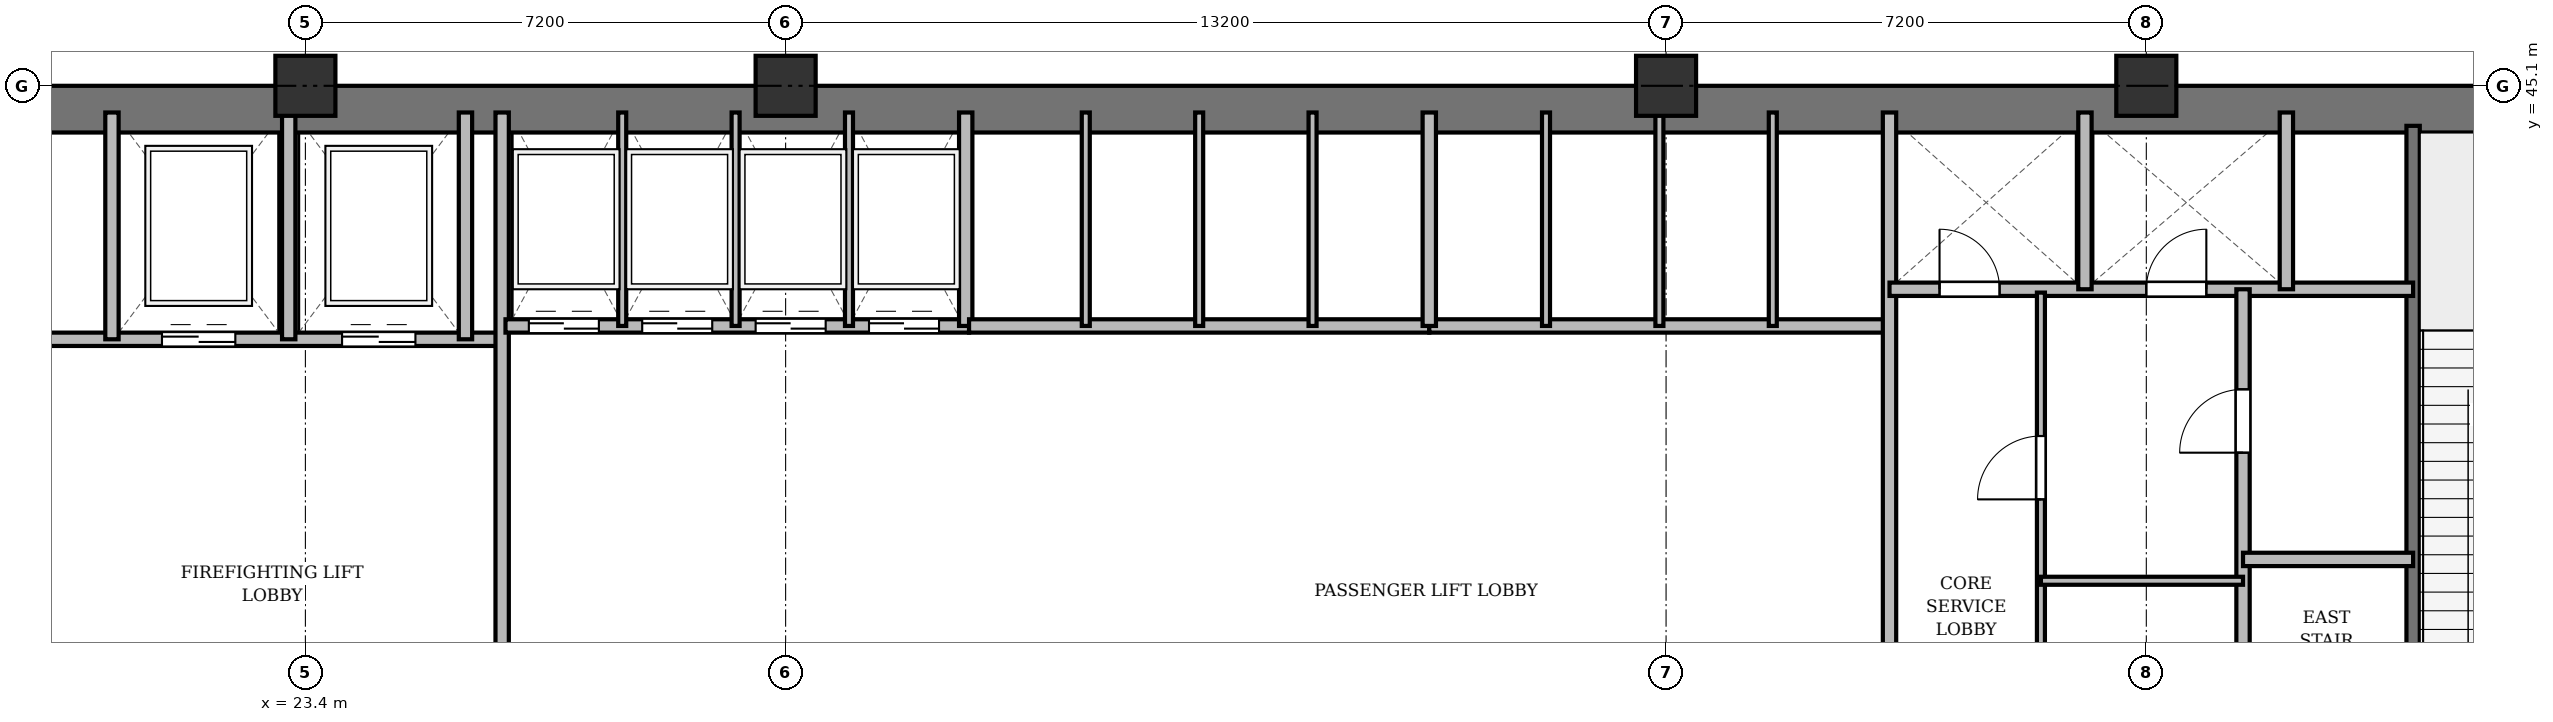
"""IFC4 building model, lengths in metres.
Left out: names, types, materials, properties, quantities, classifications, styles, units other than length and angle.
Written with IfcOpenShell. Run it as: python <this file> out.ifc"""

import sys

from ifc_helpers import new_model, si_unit, direction, frame, frame_2d, origin, origin_2d, place, context, subcontext, project, spatial, rectangle, extrude, source, transform, mapped, element, fill, save


model = new_model("IFC4")
c1 = context("Model", 3, precision=1e-05, world=origin(), true_north=direction((0.0, 1.0)))
c2 = subcontext(c1, "Body", "Model", "MODEL_VIEW")
j1 = project(units=[si_unit("LENGTHUNIT", "METRE"), si_unit("PLANEANGLEUNIT", "RADIAN")], contexts=[c1])
p1 = place(None, origin())
s1 = spatial("IfcSite", under=j1, at=p1, CompositionType="ELEMENT")
p2 = place(p1, origin())
s2 = spatial("IfcBuilding", under=s1, at=p2, CompositionType="ELEMENT")
p3 = place(p2, frame((0.0, 0.0, 73.9)))
s3 = spatial("IfcBuildingStorey", under=s2, at=p3, CompositionType="ELEMENT", Elevation=73.9)
m1 = source(origin(), c2, "Body", "SweptSolid", [
    extrude(rectangle(XDim=0.9, YDim=0.9, at=origin_2d()), origin(), (0.0, 0.0, 1.0), 7.8),
])
for number, where, z_axis, x_axis in (
    (1, (23.4, 45.1, 0.0), (0.0, 0.0, 1.0), (1.0, 0.0, 0.0)),
    (2, (30.6, 45.1, 0.0), (0.0, 0.0, 1.0), (1.0, 0.0, 0.0)),
    (3, (43.8, 45.1, 0.0), (0.0, 0.0, 1.0), (1.0, 0.0, 0.0)),
    (4, (51.0, 45.1, 0.0), (0.0, 0.0, 1.0), (1.0, 0.0, 0.0)),
):
    element("IfcColumn", number, at=place(p3, frame(where, z_axis=z_axis, x_axis=x_axis)), inside=s3, PredefinedType="COLUMN", context=c2, shape_type="MappedRepresentation", body=[
        mapped(m1, transform((0.0, 0.0, 0.0), x_axis=(1.0, 0.0, 0.0), y_axis=(0.0, 1.0, 0.0), z_axis=(0.0, 0.0, 1.0), scale=1.0)),
    ])
p4 = place(p3, frame((15.5, 44.75, 0.0), z_axis=(0.0, 0.0, 1.0), x_axis=(1.0, 0.0, 0.0)))
e5 = element("IfcWall", 5, at=p4, inside=s3, PredefinedType="SHEAR", context=c2, shape_type="SweptSolid", body=[
    extrude(rectangle(XDim=43.4, YDim=0.7, at=frame_2d((21.7, 0.0))), origin(), (0.0, 0.0, 1.0), 7.42),
])
p5 = place(p3, frame((55.0, 33.4, 0.0), z_axis=(0.0, 0.0, 1.0), x_axis=(0.0, 1.0, 0.0)))
e6 = element("IfcWall", 6, at=p5, inside=s3, PredefinedType="SHEAR", context=c2, shape_type="SweptSolid", body=[
    extrude(rectangle(XDim=11.1, YDim=0.2, at=frame_2d((5.55, 0.0))), origin(), (0.0, 0.0, 1.0), 7.42),
])
p6 = place(p5, frame((0.85, 0.0, 0.0)))
e7 = element("IfcOpeningElement", 7, at=p6, cuts=e6, PredefinedType="OPENING", context=c2, shape_type="SweptSolid", body=[
    extrude(rectangle(XDim=1.1, YDim=2.15, at=frame_2d((0.55, 1.075))), frame((0.0, 0.11, 0.0), z_axis=(0.0, -1.0, 0.0), x_axis=(1.0, 0.0, 0.0)), (0.0, 0.0, 1.0), 0.22),
])
p7 = place(p3, frame((19.55, 41.3, 0.0), z_axis=(0.0, 0.0, 1.0), x_axis=(1.0, 0.0, 0.0)))
e8 = element("IfcWall", 8, at=p7, inside=s3, PredefinedType="SOLIDWALL", context=c2, shape_type="SweptSolid", body=[
    extrude(rectangle(XDim=6.75, YDim=0.2, at=frame_2d((3.375, 0.0))), origin(), (0.0, 0.0, 1.0), 7.42),
])
p8 = place(p7, frame((1.7, 0.0, 0.0)))
e9 = element("IfcOpeningElement", 9, at=p8, cuts=e8, PredefinedType="OPENING", context=c2, shape_type="SweptSolid", body=[
    extrude(rectangle(XDim=1.1, YDim=2.15, at=frame_2d((0.55, 1.075))), frame((0.0, 0.11, 0.0), z_axis=(0.0, -1.0, 0.0), x_axis=(1.0, 0.0, 0.0)), (0.0, 0.0, 1.0), 0.22),
])
p9 = place(p7, frame((4.4, 0.0, 0.0)))
e10 = element("IfcOpeningElement", 10, at=p9, cuts=e8, PredefinedType="OPENING", context=c2, shape_type="SweptSolid", body=[
    extrude(rectangle(XDim=1.1, YDim=2.15, at=frame_2d((0.55, 1.075))), frame((0.0, 0.11, 0.0), z_axis=(0.0, -1.0, 0.0), x_axis=(1.0, 0.0, 0.0)), (0.0, 0.0, 1.0), 0.22),
])
for number, where, z_axis, x_axis in (
    (11, (20.5, 41.3, 0.0), (0.0, 0.0, 1.0), (0.0, 1.0, 0.0)),
    (12, (23.15, 41.3, 0.0), (0.0, 0.0, 1.0), (0.0, 1.0, 0.0)),
    (13, (25.8, 41.3, 0.0), (0.0, 0.0, 1.0), (0.0, 1.0, 0.0)),
):
    element("IfcWall", number, at=place(p3, frame(where, z_axis=z_axis, x_axis=x_axis)), inside=s3, PredefinedType="SOLIDWALL", context=c2, shape_type="SweptSolid", body=[
        extrude(rectangle(XDim=3.4, YDim=0.2, at=frame_2d((1.7, 0.0))), origin(), (0.0, 0.0, 1.0), 7.42),
    ])
p10 = place(p3, frame((26.35, 33.4, 0.0), z_axis=(0.0, 0.0, 1.0), x_axis=(0.0, 1.0, 0.0)))
e14 = element("IfcWall", 14, at=p10, inside=s3, PredefinedType="SOLIDWALL", context=c2, shape_type="SweptSolid", body=[
    extrude(rectangle(XDim=11.3, YDim=0.2, at=frame_2d((5.65, 0.0))), origin(), (0.0, 0.0, 1.0), 6.77),
])
p11 = place(p3, frame((26.4, 41.5, 0.0), z_axis=(0.0, 0.0, 1.0), x_axis=(1.0, 0.0, 0.0)))
e15 = element("IfcWall", 15, at=p11, inside=s3, PredefinedType="SOLIDWALL", context=c2, shape_type="SweptSolid", body=[
    extrude(rectangle(XDim=6.95, YDim=0.2, at=frame_2d((3.475, 0.0))), origin(), (0.0, 0.0, 1.0), 7.42),
])
p12 = place(p11, frame((0.35, 0.0, 0.0)))
e16 = element("IfcOpeningElement", 16, at=p12, cuts=e15, PredefinedType="OPENING", context=c2, shape_type="SweptSolid", body=[
    extrude(rectangle(XDim=1.05, YDim=2.15, at=frame_2d((0.525, 1.075))), frame((0.0, 0.11, 0.0), z_axis=(0.0, -1.0, 0.0), x_axis=(1.0, 0.0, 0.0)), (0.0, 0.0, 1.0), 0.22),
])
p13 = place(p11, frame((2.05, 0.0, 0.0)))
e17 = element("IfcOpeningElement", 17, at=p13, cuts=e15, PredefinedType="OPENING", context=c2, shape_type="SweptSolid", body=[
    extrude(rectangle(XDim=1.05, YDim=2.15, at=frame_2d((0.525, 1.075))), frame((0.0, 0.11, 0.0), z_axis=(0.0, -1.0, 0.0), x_axis=(1.0, 0.0, 0.0)), (0.0, 0.0, 1.0), 0.22),
])
p14 = place(p11, frame((3.75, 0.0, 0.0)))
e18 = element("IfcOpeningElement", 18, at=p14, cuts=e15, PredefinedType="OPENING", context=c2, shape_type="SweptSolid", body=[
    extrude(rectangle(XDim=1.05, YDim=2.15, at=frame_2d((0.525, 1.075))), frame((0.0, 0.11, 0.0), z_axis=(0.0, -1.0, 0.0), x_axis=(1.0, 0.0, 0.0)), (0.0, 0.0, 1.0), 0.22),
])
p15 = place(p11, frame((5.45, 0.0, 0.0)))
e19 = element("IfcOpeningElement", 19, at=p15, cuts=e15, PredefinedType="OPENING", context=c2, shape_type="SweptSolid", body=[
    extrude(rectangle(XDim=1.05, YDim=2.15, at=frame_2d((0.525, 1.075))), frame((0.0, 0.11, 0.0), z_axis=(0.0, -1.0, 0.0), x_axis=(1.0, 0.0, 0.0)), (0.0, 0.0, 1.0), 0.22),
])
p16 = place(p3, frame((33.3, 41.5, 0.0), z_axis=(0.0, 0.0, 1.0), x_axis=(0.0, 1.0, 0.0)))
e20 = element("IfcWall", 20, at=p16, inside=s3, PredefinedType="SOLIDWALL", context=c2, shape_type="SweptSolid", body=[
    extrude(rectangle(XDim=3.2, YDim=0.2, at=frame_2d((1.6, 0.0))), origin(), (0.0, 0.0, 1.0), 7.42),
])
for number, where, z_axis, x_axis in (
    (21, (28.15, 41.5, 0.0), (0.0, 0.0, 1.0), (0.0, 1.0, 0.0)),
    (22, (29.85, 41.5, 0.0), (0.0, 0.0, 1.0), (0.0, 1.0, 0.0)),
    (23, (31.55, 41.5, 0.0), (0.0, 0.0, 1.0), (0.0, 1.0, 0.0)),
):
    element("IfcWall", number, at=place(p3, frame(where, z_axis=z_axis, x_axis=x_axis)), inside=s3, PredefinedType="PARTITIONING", context=c2, shape_type="SweptSolid", body=[
        extrude(rectangle(XDim=3.2, YDim=0.12, at=frame_2d((1.6, 0.0))), origin(), (0.0, 0.0, 1.0), 7.42),
    ])
p17 = place(p3, frame((33.35, 41.5, 0.0), z_axis=(0.0, 0.0, 1.0), x_axis=(1.0, 0.0, 0.0)))
e24 = element("IfcWall", 24, at=p17, inside=s3, PredefinedType="SOLIDWALL", context=c2, shape_type="SweptSolid", body=[
    extrude(rectangle(XDim=6.9, YDim=0.2, at=frame_2d((3.45, 0.0))), origin(), (0.0, 0.0, 1.0), 7.42),
])
for number, where, z_axis, x_axis in (
    (25, (35.1, 41.5, 0.0), (0.0, 0.0, 1.0), (0.0, 1.0, 0.0)),
    (26, (36.8, 41.5, 0.0), (0.0, 0.0, 1.0), (0.0, 1.0, 0.0)),
    (27, (38.5, 41.5, 0.0), (0.0, 0.0, 1.0), (0.0, 1.0, 0.0)),
):
    element("IfcWall", number, at=place(p3, frame(where, z_axis=z_axis, x_axis=x_axis)), inside=s3, PredefinedType="PARTITIONING", context=c2, shape_type="SweptSolid", body=[
        extrude(rectangle(XDim=3.2, YDim=0.12, at=frame_2d((1.6, 0.0))), origin(), (0.0, 0.0, 1.0), 7.42),
    ])
p18 = place(p3, frame((40.25, 41.5, 0.0), z_axis=(0.0, 0.0, 1.0), x_axis=(1.0, 0.0, 0.0)))
e28 = element("IfcWall", 28, at=p18, inside=s3, PredefinedType="SOLIDWALL", context=c2, shape_type="SweptSolid", body=[
    extrude(rectangle(XDim=6.9, YDim=0.2, at=frame_2d((3.45, 0.0))), origin(), (0.0, 0.0, 1.0), 6.832),
])
p19 = place(p3, frame((40.25, 41.5, 0.0), z_axis=(0.0, 0.0, 1.0), x_axis=(0.0, 1.0, 0.0)))
e29 = element("IfcWall", 29, at=p19, inside=s3, PredefinedType="SOLIDWALL", context=c2, shape_type="SweptSolid", body=[
    extrude(rectangle(XDim=3.2, YDim=0.2, at=frame_2d((1.6, 0.0))), origin(), (0.0, 0.0, 1.0), 7.42),
])
p20 = place(p3, frame((42.0, 41.5, 0.0), z_axis=(0.0, 0.0, 1.0), x_axis=(0.0, 1.0, 0.0)))
e30 = element("IfcWall", 30, at=p20, inside=s3, PredefinedType="PARTITIONING", context=c2, shape_type="SweptSolid", body=[
    extrude(rectangle(XDim=3.2, YDim=0.12, at=frame_2d((1.6, 0.0))), origin(), (0.0, 0.0, 1.0), 7.42),
])
p21 = place(p3, frame((43.7, 41.5, 0.0), z_axis=(0.0, 0.0, 1.0), x_axis=(0.0, 1.0, 0.0)))
e31 = element("IfcWall", 31, at=p21, inside=s3, PredefinedType="PARTITIONING", context=c2, shape_type="SweptSolid", body=[
    extrude(rectangle(XDim=3.2, YDim=0.12, at=frame_2d((1.6, 0.0))), origin(), (0.0, 0.0, 1.0), 6.832),
])
p22 = place(p3, frame((45.4, 41.5, 0.0), z_axis=(0.0, 0.0, 1.0), x_axis=(0.0, 1.0, 0.0)))
e32 = element("IfcWall", 32, at=p22, inside=s3, PredefinedType="PARTITIONING", context=c2, shape_type="SweptSolid", body=[
    extrude(rectangle(XDim=3.2, YDim=0.12, at=frame_2d((1.6, 0.0))), origin(), (0.0, 0.0, 1.0), 7.42),
])
p23 = place(p3, frame((47.15, 33.4, 0.0), z_axis=(0.0, 0.0, 1.0), x_axis=(0.0, 1.0, 0.0)))
e33 = element("IfcWall", 33, at=p23, inside=s3, PredefinedType="SOLIDWALL", context=c2, shape_type="SweptSolid", body=[
    extrude(rectangle(XDim=11.3, YDim=0.2, at=frame_2d((5.65, 0.0))), origin(), (0.0, 0.0, 1.0), 6.77),
])
p24 = place(p3, frame((47.15, 42.05, 0.0), z_axis=(0.0, 0.0, 1.0), x_axis=(1.0, 0.0, 0.0)))
e34 = element("IfcWall", 34, at=p24, inside=s3, PredefinedType="SOLIDWALL", context=c2, shape_type="SweptSolid", body=[
    extrude(rectangle(XDim=7.85, YDim=0.2, at=frame_2d((3.925, 0.0))), origin(), (0.0, 0.0, 1.0), 6.832),
])
p25 = place(p24, frame((0.75, 0.0, 0.0)))
e35 = element("IfcOpeningElement", 35, at=p25, cuts=e34, PredefinedType="OPENING", context=c2, shape_type="SweptSolid", body=[
    extrude(rectangle(XDim=0.9, YDim=2.1, at=frame_2d((0.45, 1.05))), frame((0.0, 0.11, 0.0), z_axis=(0.0, -1.0, 0.0), x_axis=(1.0, 0.0, 0.0)), (0.0, 0.0, 1.0), 0.22),
])
p26 = place(p24, frame((3.85, 0.0, 0.0)))
e36 = element("IfcOpeningElement", 36, at=p26, cuts=e34, PredefinedType="OPENING", context=c2, shape_type="SweptSolid", body=[
    extrude(rectangle(XDim=0.9, YDim=2.1, at=frame_2d((0.45, 1.05))), frame((0.0, 0.11, 0.0), z_axis=(0.0, -1.0, 0.0), x_axis=(1.0, 0.0, 0.0)), (0.0, 0.0, 1.0), 0.22),
])
for number, where, z_axis, x_axis in (
    (37, (50.08, 42.05, 0.0), (0.0, 0.0, 1.0), (0.0, 1.0, 0.0)),
    (38, (53.1, 42.05, 0.0), (0.0, 0.0, 1.0), (0.0, 1.0, 0.0)),
):
    element("IfcWall", number, at=place(p3, frame(where, z_axis=z_axis, x_axis=x_axis)), inside=s3, PredefinedType="SOLIDWALL", context=c2, shape_type="SweptSolid", body=[
        extrude(rectangle(XDim=2.65, YDim=0.2, at=frame_2d((1.325, 0.0))), origin(), (0.0, 0.0, 1.0), 7.42),
    ])
p27 = place(p3, frame((52.45, 33.4, 0.0), z_axis=(0.0, 0.0, 1.0), x_axis=(0.0, 1.0, 0.0)))
e39 = element("IfcWall", 39, at=p27, inside=s3, PredefinedType="PARTITIONING", context=c2, shape_type="SweptSolid", body=[
    extrude(rectangle(XDim=8.65, YDim=0.2, at=frame_2d((4.325, 0.0))), origin(), (0.0, 0.0, 1.0), 6.77),
])
p28 = place(p27, frame((6.2, 0.0, 0.0)))
e40 = element("IfcOpeningElement", 40, at=p28, cuts=e39, PredefinedType="OPENING", context=c2, shape_type="SweptSolid", body=[
    extrude(rectangle(XDim=0.95, YDim=2.15, at=frame_2d((0.475, 1.075))), frame((0.0, 0.11, 0.0), z_axis=(0.0, -1.0, 0.0), x_axis=(1.0, 0.0, 0.0)), (0.0, 0.0, 1.0), 0.22),
])
p29 = place(p3, frame((52.45, 38.0, 0.0), z_axis=(0.0, 0.0, 1.0), x_axis=(1.0, 0.0, 0.0)))
e41 = element("IfcWall", 41, at=p29, inside=s3, PredefinedType="PARTITIONING", context=c2, shape_type="SweptSolid", body=[
    extrude(rectangle(XDim=2.55, YDim=0.2, at=frame_2d((1.275, 0.0))), origin(), (0.0, 0.0, 1.0), 7.42),
])
p30 = place(p3, frame((49.42, 33.4, 0.0), z_axis=(0.0, 0.0, 1.0), x_axis=(0.0, 1.0, 0.0)))
e42 = element("IfcWall", 42, at=p30, inside=s3, PredefinedType="PARTITIONING", context=c2, shape_type="SweptSolid", body=[
    extrude(rectangle(XDim=8.6, YDim=0.12, at=frame_2d((4.3, 0.0))), origin(), (0.0, 0.0, 1.0), 6.77),
])
p31 = place(p30, frame((1.3, 0.0, 0.0)))
e43 = element("IfcOpeningElement", 43, at=p31, cuts=e42, PredefinedType="OPENING", context=c2, shape_type="SweptSolid", body=[
    extrude(rectangle(XDim=0.95, YDim=2.15, at=frame_2d((0.475, 1.075))), frame((0.0, 0.07, 0.0), z_axis=(0.0, -1.0, 0.0), x_axis=(1.0, 0.0, 0.0)), (0.0, 0.0, 1.0), 0.14),
])
p32 = place(p30, frame((5.5, 0.0, 0.0)))
e44 = element("IfcOpeningElement", 44, at=p32, cuts=e42, PredefinedType="OPENING", context=c2, shape_type="SweptSolid", body=[
    extrude(rectangle(XDim=0.95, YDim=2.15, at=frame_2d((0.475, 1.075))), frame((0.0, 0.07, 0.0), z_axis=(0.0, -1.0, 0.0), x_axis=(1.0, 0.0, 0.0)), (0.0, 0.0, 1.0), 0.14),
])
p33 = place(p3, frame((49.42, 37.68, 0.0), z_axis=(0.0, 0.0, 1.0), x_axis=(1.0, 0.0, 0.0)))
e45 = element("IfcWall", 45, at=p33, inside=s3, PredefinedType="PARTITIONING", context=c2, shape_type="SweptSolid", body=[
    extrude(rectangle(XDim=3.03, YDim=0.12, at=frame_2d((1.515, 0.0))), origin(), (0.0, 0.0, 1.0), 6.832),
])
m2 = source(origin(), c2, "Body", "SweptSolid", [
    extrude(rectangle(XDim=1.1, YDim=2.15, at=frame_2d((0.55, 1.075))), frame((0.0, 0.025, 0.0), z_axis=(0.0, -1.0, 0.0), x_axis=(1.0, 0.0, 0.0)), (0.0, 0.0, 1.0), 0.05),
])
p34 = place(p8, origin())
e46 = element("IfcDoor", 46, at=p34, inside=s3, OperationType="DOUBLE_DOOR_SLIDING", PredefinedType="DOOR", context=c2, shape_type="MappedRepresentation", body=[
    mapped(m2, transform((0.0, 0.0, 0.0), x_axis=(1.0, 0.0, 0.0), y_axis=(0.0, 1.0, 0.0), z_axis=(0.0, 0.0, 1.0), scale=1.0)),
])
fill(e9, e46)
p35 = place(p9, origin())
e47 = element("IfcDoor", 47, at=p35, inside=s3, OperationType="DOUBLE_DOOR_SLIDING", PredefinedType="DOOR", context=c2, shape_type="MappedRepresentation", body=[
    mapped(m2, transform((0.0, 0.0, 0.0), x_axis=(1.0, 0.0, 0.0), y_axis=(0.0, 1.0, 0.0), z_axis=(0.0, 0.0, 1.0), scale=1.0)),
])
fill(e10, e47)
m3 = source(origin(), c2, "Body", "SweptSolid", [
    extrude(rectangle(XDim=1.05, YDim=2.15, at=frame_2d((0.525, 1.075))), frame((0.0, 0.025, 0.0), z_axis=(0.0, -1.0, 0.0), x_axis=(1.0, 0.0, 0.0)), (0.0, 0.0, 1.0), 0.05),
])
p36 = place(p12, origin())
e48 = element("IfcDoor", 48, at=p36, inside=s3, OperationType="DOUBLE_DOOR_SLIDING", PredefinedType="DOOR", context=c2, shape_type="MappedRepresentation", body=[
    mapped(m3, transform((0.0, 0.0, 0.0), x_axis=(1.0, 0.0, 0.0), y_axis=(0.0, 1.0, 0.0), z_axis=(0.0, 0.0, 1.0), scale=1.0)),
])
fill(e16, e48)
p37 = place(p13, origin())
e49 = element("IfcDoor", 49, at=p37, inside=s3, OperationType="DOUBLE_DOOR_SLIDING", PredefinedType="DOOR", context=c2, shape_type="MappedRepresentation", body=[
    mapped(m3, transform((0.0, 0.0, 0.0), x_axis=(1.0, 0.0, 0.0), y_axis=(0.0, 1.0, 0.0), z_axis=(0.0, 0.0, 1.0), scale=1.0)),
])
fill(e17, e49)
p38 = place(p14, origin())
e50 = element("IfcDoor", 50, at=p38, inside=s3, OperationType="DOUBLE_DOOR_SLIDING", PredefinedType="DOOR", context=c2, shape_type="MappedRepresentation", body=[
    mapped(m3, transform((0.0, 0.0, 0.0), x_axis=(1.0, 0.0, 0.0), y_axis=(0.0, 1.0, 0.0), z_axis=(0.0, 0.0, 1.0), scale=1.0)),
])
fill(e18, e50)
p39 = place(p15, origin())
e51 = element("IfcDoor", 51, at=p39, inside=s3, OperationType="DOUBLE_DOOR_SLIDING", PredefinedType="DOOR", context=c2, shape_type="MappedRepresentation", body=[
    mapped(m3, transform((0.0, 0.0, 0.0), x_axis=(1.0, 0.0, 0.0), y_axis=(0.0, 1.0, 0.0), z_axis=(0.0, 0.0, 1.0), scale=1.0)),
])
fill(e19, e51)
m4 = source(origin(), c2, "Body", "SweptSolid", [
    extrude(rectangle(XDim=0.9, YDim=2.1, at=frame_2d((0.45, 1.05))), frame((0.0, 0.025, 0.0), z_axis=(0.0, -1.0, 0.0), x_axis=(1.0, 0.0, 0.0)), (0.0, 0.0, 1.0), 0.05),
])
p40 = place(p25, origin())
e52 = element("IfcDoor", 52, at=p40, inside=s3, OperationType="SINGLE_SWING_LEFT", PredefinedType="DOOR", context=c2, shape_type="MappedRepresentation", body=[
    mapped(m4, transform((0.0, 0.0, 0.0), x_axis=(1.0, 0.0, 0.0), y_axis=(0.0, 1.0, 0.0), z_axis=(0.0, 0.0, 1.0), scale=1.0)),
])
fill(e35, e52)
p41 = place(p26, origin())
e53 = element("IfcDoor", 53, at=p41, inside=s3, OperationType="SINGLE_SWING_RIGHT", PredefinedType="DOOR", context=c2, shape_type="MappedRepresentation", body=[
    mapped(m4, transform((0.0, 0.0, 0.0), x_axis=(1.0, 0.0, 0.0), y_axis=(0.0, 1.0, 0.0), z_axis=(0.0, 0.0, 1.0), scale=1.0)),
])
fill(e36, e53)
m5 = source(origin(), c2, "Body", "SweptSolid", [
    extrude(rectangle(XDim=0.95, YDim=2.15, at=frame_2d((0.475, 1.075))), frame((0.0, 0.025, 0.0), z_axis=(0.0, -1.0, 0.0), x_axis=(1.0, 0.0, 0.0)), (0.0, 0.0, 1.0), 0.05),
])
p42 = place(p28, origin())
e54 = element("IfcDoor", 54, at=p42, inside=s3, OperationType="SINGLE_SWING_LEFT", PredefinedType="DOOR", context=c2, shape_type="MappedRepresentation", body=[
    mapped(m5, transform((0.0, 0.0, 0.0), x_axis=(1.0, 0.0, 0.0), y_axis=(0.0, 1.0, 0.0), z_axis=(0.0, 0.0, 1.0), scale=1.0)),
])
fill(e40, e54)
p43 = place(p32, origin())
e55 = element("IfcDoor", 55, at=p43, inside=s3, OperationType="SINGLE_SWING_LEFT", PredefinedType="DOOR", context=c2, shape_type="MappedRepresentation", body=[
    mapped(m5, transform((0.0, 0.0, 0.0), x_axis=(1.0, 0.0, 0.0), y_axis=(0.0, 1.0, 0.0), z_axis=(0.0, 0.0, 1.0), scale=1.0)),
])
fill(e44, e55)
save(model, sys.argv[1])
